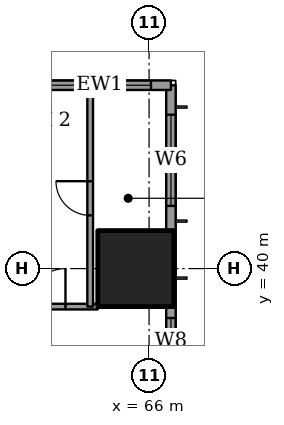
"""IFC4 building model, lengths in metres.
Left out: names, types, materials, properties, quantities, classifications, styles, units other than length and angle.
Written with IfcOpenShell. Run it as: python <this file> out.ifc"""

import sys

from ifc_helpers import new_model, si_unit, direction, frame, frame_2d, origin, origin_2d, place, context, subcontext, project, spatial, rectangle, extrude, element, fill, save


model = new_model("IFC4")
c1 = context("Model", 3, precision=1e-05, world=origin(), true_north=direction((0.0, 1.0)))
c2 = subcontext(c1, "Body", "Model", "MODEL_VIEW")
j1 = project(units=[si_unit("LENGTHUNIT", "METRE"), si_unit("PLANEANGLEUNIT", "RADIAN")], contexts=[c1])
p1 = place(None, origin())
s1 = spatial("IfcSite", under=j1, at=p1, CompositionType="ELEMENT")
p2 = place(p1, origin())
s2 = spatial("IfcBuilding", under=s1, at=p2, CompositionType="ELEMENT")
p3 = place(p2, frame((0.0, 0.0, 58.4)))
s3 = spatial("IfcBuildingStorey", under=s2, at=p3, CompositionType="ELEMENT", Elevation=58.4)
p4 = place(p3, frame((65.65, 40.0, 0.0), z_axis=(0.0, 0.0, 1.0), x_axis=(1.0, 0.0, 0.0)))
e1 = element("IfcColumn", 1, at=p4, inside=s3, PredefinedType="COLUMN", context=c2, shape_type="SweptSolid", body=[
    extrude(rectangle(XDim=2.0, YDim=2.0, at=origin_2d()), origin(), (0.0, 0.0, 1.0), 3.6),
])
p5 = place(p3, frame((66.575, 3.175, 0.0), z_axis=(0.0, 0.0, 1.0), x_axis=(0.0, 1.0, 0.0)))
e2 = element("IfcWall", 2, at=p5, inside=s3, PredefinedType="SOLIDWALL", context=c2, shape_type="SweptSolid", body=[
    extrude(rectangle(XDim=41.65, YDim=0.25, at=frame_2d((20.825, 0.0))), origin(), (0.0, 0.0, 1.0), 3.6),
])
p6 = place(p5, frame((0.775, 0.0, 0.6)))
e3 = element("IfcOpeningElement", 3, at=p6, cuts=e2, PredefinedType="OPENING", context=c2, shape_type="SweptSolid", body=[
    extrude(rectangle(XDim=2.4, YDim=2.0, at=frame_2d((1.2, 1.0))), frame((0.0, 0.135, 0.0), z_axis=(0.0, -1.0, 0.0), x_axis=(1.0, 0.0, 0.0)), (0.0, 0.0, 1.0), 0.27),
])
p7 = place(p5, frame((6.1, 0.0, 0.6)))
e4 = element("IfcOpeningElement", 4, at=p7, cuts=e2, PredefinedType="OPENING", context=c2, shape_type="SweptSolid", body=[
    extrude(rectangle(XDim=1.2, YDim=2.0, at=frame_2d((0.6, 1.0))), frame((0.0, 0.135, 0.0), z_axis=(0.0, -1.0, 0.0), x_axis=(1.0, 0.0, 0.0)), (0.0, 0.0, 1.0), 0.27),
])
p8 = place(p5, frame((8.275, 0.0, 0.6)))
e5 = element("IfcOpeningElement", 5, at=p8, cuts=e2, PredefinedType="OPENING", context=c2, shape_type="SweptSolid", body=[
    extrude(rectangle(XDim=2.4, YDim=2.0, at=frame_2d((1.2, 1.0))), frame((0.0, 0.135, 0.0), z_axis=(0.0, -1.0, 0.0), x_axis=(1.0, 0.0, 0.0)), (0.0, 0.0, 1.0), 0.27),
])
p9 = place(p5, frame((15.775, 0.0, 0.6)))
e6 = element("IfcOpeningElement", 6, at=p9, cuts=e2, PredefinedType="OPENING", context=c2, shape_type="SweptSolid", body=[
    extrude(rectangle(XDim=2.4, YDim=2.0, at=frame_2d((1.2, 1.0))), frame((0.0, 0.135, 0.0), z_axis=(0.0, -1.0, 0.0), x_axis=(1.0, 0.0, 0.0)), (0.0, 0.0, 1.0), 0.27),
])
p10 = place(p5, frame((23.475, 0.0, 0.6)))
e7 = element("IfcOpeningElement", 7, at=p10, cuts=e2, PredefinedType="OPENING", context=c2, shape_type="SweptSolid", body=[
    extrude(rectangle(XDim=2.4, YDim=2.0, at=frame_2d((1.2, 1.0))), frame((0.0, 0.135, 0.0), z_axis=(0.0, -1.0, 0.0), x_axis=(1.0, 0.0, 0.0)), (0.0, 0.0, 1.0), 0.27),
])
p11 = place(p5, frame((30.875, 0.0, 0.6)))
e8 = element("IfcOpeningElement", 8, at=p11, cuts=e2, PredefinedType="OPENING", context=c2, shape_type="SweptSolid", body=[
    extrude(rectangle(XDim=2.4, YDim=2.0, at=frame_2d((1.2, 1.0))), frame((0.0, 0.135, 0.0), z_axis=(0.0, -1.0, 0.0), x_axis=(1.0, 0.0, 0.0)), (0.0, 0.0, 1.0), 0.27),
])
p12 = place(p5, frame((34.325, 0.0, 0.6)))
e9 = element("IfcOpeningElement", 9, at=p12, cuts=e2, PredefinedType="OPENING", context=c2, shape_type="SweptSolid", body=[
    extrude(rectangle(XDim=1.2, YDim=2.0, at=frame_2d((0.6, 1.0))), frame((0.0, 0.135, 0.0), z_axis=(0.0, -1.0, 0.0), x_axis=(1.0, 0.0, 0.0)), (0.0, 0.0, 1.0), 0.27),
])
p13 = place(p5, frame((38.475, 0.0, 0.6)))
e10 = element("IfcOpeningElement", 10, at=p13, cuts=e2, PredefinedType="OPENING", context=c2, shape_type="SweptSolid", body=[
    extrude(rectangle(XDim=2.4, YDim=2.0, at=frame_2d((1.2, 1.0))), frame((0.0, 0.135, 0.0), z_axis=(0.0, -1.0, 0.0), x_axis=(1.0, 0.0, 0.0)), (0.0, 0.0, 1.0), 0.27),
])
p14 = place(p3, frame((66.575, 44.825, 0.0), z_axis=(0.0, 0.0, 1.0), x_axis=(-1.0, 0.0, 0.0)))
e11 = element("IfcWall", 11, at=p14, inside=s3, PredefinedType="SOLIDWALL", context=c2, shape_type="SweptSolid", body=[
    extrude(rectangle(XDim=3.75, YDim=0.25, at=frame_2d((1.875, 0.0))), origin(), (0.0, 0.0, 1.0), 3.6),
])
p15 = place(p14, frame((0.525, 0.0, 0.6)))
e12 = element("IfcOpeningElement", 12, at=p15, cuts=e11, PredefinedType="OPENING", context=c2, shape_type="SweptSolid", body=[
    extrude(rectangle(XDim=1.2, YDim=2.0, at=frame_2d((0.6, 1.0))), frame((0.0, 0.135, 0.0), z_axis=(0.0, -1.0, 0.0), x_axis=(1.0, 0.0, 0.0)), (0.0, 0.0, 1.0), 0.27),
])
p16 = place(p14, frame((2.413, 0.0, 0.6)))
e13 = element("IfcOpeningElement", 13, at=p16, cuts=e11, PredefinedType="OPENING", context=c2, shape_type="SweptSolid", body=[
    extrude(rectangle(XDim=1.2, YDim=2.0, at=frame_2d((0.6, 1.0))), frame((0.0, 0.135, 0.0), z_axis=(0.0, -1.0, 0.0), x_axis=(1.0, 0.0, 0.0)), (0.0, 0.0, 1.0), 0.27),
])
p17 = place(p3, frame((59.0, 39.0, 0.0), z_axis=(0.0, 0.0, 1.0), x_axis=(1.0, 0.0, 0.0)))
e14 = element("IfcWall", 14, at=p17, inside=s3, PredefinedType="PARTITIONING", context=c2, shape_type="SweptSolid", body=[
    extrude(rectangle(XDim=5.65, YDim=0.15, at=frame_2d((2.825, 0.0))), origin(), (0.0, 0.0, 1.0), 3.35),
])
p18 = place(p17, frame((3.8, 0.0, 0.0)))
e15 = element("IfcOpeningElement", 15, at=p18, cuts=e14, PredefinedType="OPENING", context=c2, shape_type="SweptSolid", body=[
    extrude(rectangle(XDim=1.0, YDim=2.1, at=frame_2d((0.5, 1.05))), frame((0.0, 0.085, 0.0), z_axis=(0.0, -1.0, 0.0), x_axis=(1.0, 0.0, 0.0)), (0.0, 0.0, 1.0), 0.17),
])
p19 = place(p3, frame((64.45, 39.0, 0.0), z_axis=(0.0, 0.0, 1.0), x_axis=(0.0, 1.0, 0.0)))
e16 = element("IfcWall", 16, at=p19, inside=s3, PredefinedType="PARTITIONING", context=c2, shape_type="SweptSolid", body=[
    extrude(rectangle(XDim=5.7, YDim=0.15, at=frame_2d((2.85, 0.0))), origin(), (0.0, 0.0, 1.0), 3.35),
])
p20 = place(p19, frame((2.4, 0.0, 0.0)))
e17 = element("IfcOpeningElement", 17, at=p20, cuts=e16, PredefinedType="OPENING", context=c2, shape_type="SweptSolid", body=[
    extrude(rectangle(XDim=0.9, YDim=2.1, at=frame_2d((0.45, 1.05))), frame((0.0, 0.085, 0.0), z_axis=(0.0, -1.0, 0.0), x_axis=(1.0, 0.0, 0.0)), (0.0, 0.0, 1.0), 0.17),
])
p21 = place(p12, origin())
e18 = element("IfcWindow", 18, at=p21, inside=s3, PartitioningType="SINGLE_PANEL", PredefinedType="WINDOW", context=c2, shape_type="SweptSolid", body=[
    extrude(rectangle(XDim=1.2, YDim=2.0, at=frame_2d((0.6, 1.0))), frame((0.0, 0.03, 0.0), z_axis=(0.0, -1.0, 0.0), x_axis=(1.0, 0.0, 0.0)), (0.0, 0.0, 1.0), 0.06),
])
fill(e9, e18)
p22 = place(p13, origin())
e19 = element("IfcWindow", 19, at=p22, inside=s3, PartitioningType="SINGLE_PANEL", PredefinedType="WINDOW", context=c2, shape_type="SweptSolid", body=[
    extrude(rectangle(XDim=2.4, YDim=2.0, at=frame_2d((1.2, 1.0))), frame((0.0, 0.03, 0.0), z_axis=(0.0, -1.0, 0.0), x_axis=(1.0, 0.0, 0.0)), (0.0, 0.0, 1.0), 0.06),
])
fill(e10, e19)
p23 = place(p15, origin())
e20 = element("IfcWindow", 20, at=p23, inside=s3, PartitioningType="SINGLE_PANEL", PredefinedType="WINDOW", context=c2, shape_type="SweptSolid", body=[
    extrude(rectangle(XDim=1.2, YDim=2.0, at=frame_2d((0.6, 1.0))), frame((0.0, 0.03, 0.0), z_axis=(0.0, -1.0, 0.0), x_axis=(1.0, 0.0, 0.0)), (0.0, 0.0, 1.0), 0.06),
])
fill(e12, e20)
p24 = place(p16, origin())
e21 = element("IfcWindow", 21, at=p24, inside=s3, PartitioningType="SINGLE_PANEL", PredefinedType="WINDOW", context=c2, shape_type="SweptSolid", body=[
    extrude(rectangle(XDim=1.2, YDim=2.0, at=frame_2d((0.6, 1.0))), frame((0.0, 0.03, 0.0), z_axis=(0.0, -1.0, 0.0), x_axis=(1.0, 0.0, 0.0)), (0.0, 0.0, 1.0), 0.06),
])
fill(e13, e21)
p25 = place(p20, origin())
e22 = element("IfcDoor", 22, at=p25, inside=s3, OperationType="SINGLE_SWING_LEFT", PredefinedType="DOOR", context=c2, shape_type="SweptSolid", body=[
    extrude(rectangle(XDim=0.9, YDim=2.1, at=frame_2d((0.45, 1.05))), frame((0.0, 0.025, 0.0), z_axis=(0.0, -1.0, 0.0), x_axis=(1.0, 0.0, 0.0)), (0.0, 0.0, 1.0), 0.05),
])
fill(e17, e22)
p26 = place(p18, origin())
e23 = element("IfcDoor", 23, at=p26, inside=s3, OperationType="SINGLE_SWING_LEFT", PredefinedType="DOOR", context=c2, shape_type="SweptSolid", body=[
    extrude(rectangle(XDim=1.0, YDim=2.1, at=frame_2d((0.5, 1.05))), frame((0.0, 0.025, 0.0), z_axis=(0.0, -1.0, 0.0), x_axis=(1.0, 0.0, 0.0)), (0.0, 0.0, 1.0), 0.05),
])
fill(e15, e23)
save(model, sys.argv[1])
